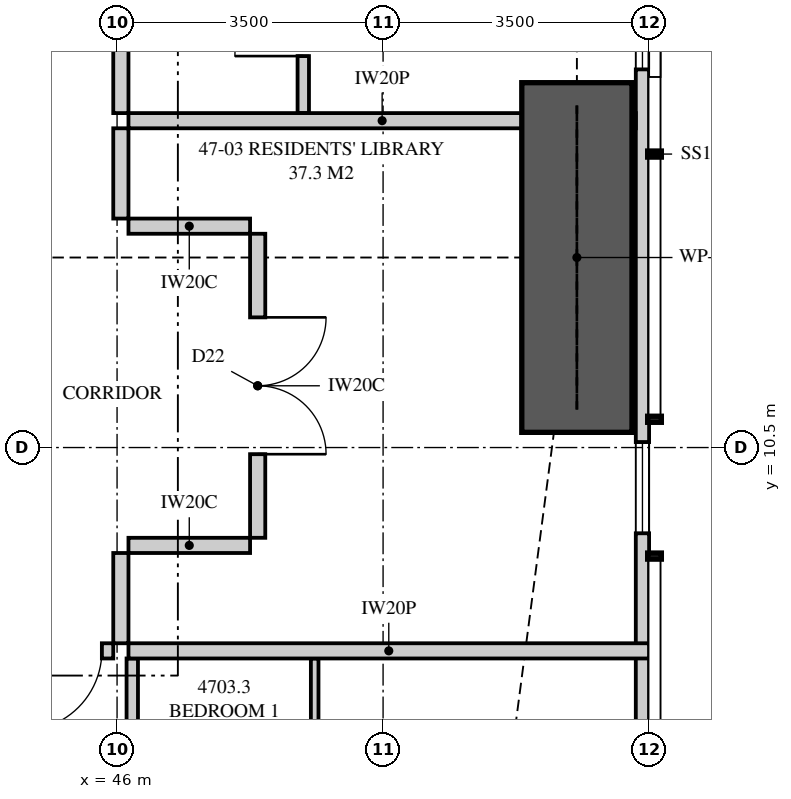
"""IFC4 building model, lengths in metres.
Left out: names, types, materials, properties, quantities, classifications, styles, units other than length and angle.
Written with IfcOpenShell. Run it as: python <this file> out.ifc"""

import sys

from ifc_helpers import new_model, si_unit, direction, frame, frame_2d, origin, place, context, subcontext, project, spatial, polyline, rectangle, outline, extrude, element, fill, save


model = new_model("IFC4")
c1 = context("Model", 3, precision=1e-05, world=origin(), true_north=direction((0.0, 1.0)))
c2 = subcontext(c1, "Body", "Model", "MODEL_VIEW")
j1 = project(units=[si_unit("LENGTHUNIT", "METRE"), si_unit("PLANEANGLEUNIT", "RADIAN")], contexts=[c1])
p1 = place(None, origin())
s1 = spatial("IfcSite", under=j1, at=p1, CompositionType="ELEMENT")
p2 = place(p1, origin())
s2 = spatial("IfcBuilding", under=s1, at=p2, CompositionType="ELEMENT")
p3 = place(p2, frame((0.0, 0.0, 174.45)))
s3 = spatial("IfcBuildingStorey", under=s2, at=p3, CompositionType="ELEMENT", Elevation=174.45)
p4 = place(p3, frame((52.913, 3.051, 0.0), z_axis=(0.0, 0.0, 1.0), x_axis=(0.0, 1.0, 0.0)))
e1 = element("IfcWall", 1, at=p4, inside=s3, PredefinedType="SOLIDWALL", context=c2, shape_type="SweptSolid", body=[
    extrude(outline(polyline([(0.0, 0.0), (29.897, 0.0), (29.897, 3.11), (22.167, 3.11), (22.167, 2.15), (22.074, 2.15), (22.074, 3.11), (21.949, 3.11), (21.949, 2.15), (9.949, 2.15), (9.949, 3.11), (9.847, 3.11), (9.847, 2.15), (9.706, 2.15), (9.706, 3.11), (0.0, 3.11), (0.0, 0.0)])), frame((0.0, 0.087, 0.0), z_axis=(0.0, -1.0, 0.0), x_axis=(1.0, 0.0, 0.0)), (0.0, 0.0, 1.0), 0.175),
])
p5 = place(p4, frame((1.797, 0.0, 0.4)))
e2 = element("IfcOpeningElement", 2, at=p5, cuts=e1, PredefinedType="OPENING", context=c2, shape_type="SweptSolid", body=[
    extrude(rectangle(XDim=1.8, YDim=1.7, at=frame_2d((0.9, 0.85))), frame((0.0, 0.097, 0.0), z_axis=(0.0, -1.0, 0.0), x_axis=(1.0, 0.0, 0.0)), (0.0, 0.0, 1.0), 0.195),
])
p6 = place(p4, frame((6.321, 0.0, 0.4)))
e3 = element("IfcOpeningElement", 3, at=p6, cuts=e1, PredefinedType="OPENING", context=c2, shape_type="SweptSolid", body=[
    extrude(rectangle(XDim=1.2, YDim=1.7, at=frame_2d((0.6, 0.85))), frame((0.0, 0.097, 0.0), z_axis=(0.0, -1.0, 0.0), x_axis=(1.0, 0.0, 0.0)), (0.0, 0.0, 1.0), 0.195),
])
p7 = place(p4, frame((12.424, 0.0, 0.4)))
e4 = element("IfcOpeningElement", 4, at=p7, cuts=e1, PredefinedType="OPENING", context=c2, shape_type="SweptSolid", body=[
    extrude(rectangle(XDim=1.8, YDim=1.7, at=frame_2d((0.9, 0.85))), frame((0.0, 0.097, 0.0), z_axis=(0.0, -1.0, 0.0), x_axis=(1.0, 0.0, 0.0)), (0.0, 0.0, 1.0), 0.195),
])
p8 = place(p4, frame((15.274, 0.0, 0.0)))
e5 = element("IfcOpeningElement", 5, at=p8, cuts=e1, PredefinedType="OPENING", context=c2, shape_type="SweptSolid", body=[
    extrude(rectangle(XDim=1.8, YDim=2.1, at=frame_2d((0.9, 1.05))), frame((0.0, 0.097, 0.0), z_axis=(0.0, -1.0, 0.0), x_axis=(1.0, 0.0, 0.0)), (0.0, 0.0, 1.0), 0.195),
])
p9 = place(p4, frame((17.736, 0.0, 0.4)))
e6 = element("IfcOpeningElement", 6, at=p9, cuts=e1, PredefinedType="OPENING", context=c2, shape_type="SweptSolid", body=[
    extrude(rectangle(XDim=1.8, YDim=1.7, at=frame_2d((0.9, 0.85))), frame((0.0, 0.097, 0.0), z_axis=(0.0, -1.0, 0.0), x_axis=(1.0, 0.0, 0.0)), (0.0, 0.0, 1.0), 0.195),
])
p10 = place(p4, frame((24.373, 0.0, 0.4)))
e7 = element("IfcOpeningElement", 7, at=p10, cuts=e1, PredefinedType="OPENING", context=c2, shape_type="SweptSolid", body=[
    extrude(rectangle(XDim=1.2, YDim=1.7, at=frame_2d((0.6, 0.85))), frame((0.0, 0.097, 0.0), z_axis=(0.0, -1.0, 0.0), x_axis=(1.0, 0.0, 0.0)), (0.0, 0.0, 1.0), 0.195),
])
p11 = place(p4, frame((26.861, 0.0, 0.4)))
e8 = element("IfcOpeningElement", 8, at=p11, cuts=e1, PredefinedType="OPENING", context=c2, shape_type="SweptSolid", body=[
    extrude(rectangle(XDim=2.4, YDim=1.7, at=frame_2d((1.2, 0.85))), frame((0.0, 0.097, 0.0), z_axis=(0.0, -1.0, 0.0), x_axis=(1.0, 0.0, 0.0)), (0.0, 0.0, 1.0), 0.195),
])
p12 = place(p3, frame((41.3, 7.825, 0.0), z_axis=(0.0, 0.0, 1.0), x_axis=(1.0, 0.0, 0.0)))
e9 = element("IfcWall", 9, at=p12, inside=s3, PredefinedType="PARTITIONING", context=c2, shape_type="SweptSolid", body=[
    extrude(outline(polyline([(0.0, 0.0), (4.65, 0.0), (4.65, 3.11), (1.787, 3.11), (1.787, 2.541), (1.113, 2.541), (1.113, 3.11), (0.0, 3.11), (0.0, 0.0)])), frame((0.0, 0.1, 0.0), z_axis=(0.0, -1.0, 0.0), x_axis=(1.0, 0.0, 0.0)), (0.0, 0.0, 1.0), 0.2),
])
p13 = place(p12, frame((3.45, 0.0, 0.0)))
e10 = element("IfcOpeningElement", 10, at=p13, cuts=e9, PredefinedType="OPENING", context=c2, shape_type="SweptSolid", body=[
    extrude(rectangle(XDim=1.05, YDim=2.2, at=frame_2d((0.525, 1.1))), frame((0.0, 0.11, 0.0), z_axis=(0.0, -1.0, 0.0), x_axis=(1.0, 0.0, 0.0)), (0.0, 0.0, 1.0), 0.22),
])
p14 = place(p3, frame((48.6, 3.796, 0.0), z_axis=(0.0, 0.0, 1.0), x_axis=(0.0, 1.0, 0.0)))
e11 = element("IfcWall", 11, at=p14, inside=s3, PredefinedType="PARTITIONING", context=c2, shape_type="SweptSolid", body=[
    extrude(rectangle(XDim=3.929, YDim=0.1, at=frame_2d((1.964, 0.0))), origin(), (0.0, 0.0, 1.0), 3.11),
])
p15 = place(p14, frame((1.477, 0.0, 0.0)))
e12 = element("IfcOpeningElement", 12, at=p15, cuts=e11, PredefinedType="OPENING", context=c2, shape_type="SweptSolid", body=[
    extrude(rectangle(XDim=0.9, YDim=2.1, at=frame_2d((0.45, 1.05))), frame((0.0, 0.06, 0.0), z_axis=(0.0, -1.0, 0.0), x_axis=(1.0, 0.0, 0.0)), (0.0, 0.0, 1.0), 0.12),
])
p16 = place(p3, frame((46.2, 3.796, 0.0), z_axis=(0.0, 0.0, 1.0), x_axis=(0.0, 1.0, 0.0)))
e13 = element("IfcWall", 13, at=p16, inside=s3, PredefinedType="PLUMBINGWALL", context=c2, shape_type="SweptSolid", body=[
    extrude(rectangle(XDim=3.929, YDim=0.15, at=frame_2d((1.964, 0.0))), origin(), (0.0, 0.0, 1.0), 3.11),
])
p17 = place(p3, frame((46.15, 7.825, 0.0), z_axis=(0.0, 0.0, 1.0), x_axis=(1.0, 0.0, 0.0)))
e14 = element("IfcWall", 14, at=p17, inside=s3, PredefinedType="PARTITIONING", context=c2, shape_type="SweptSolid", body=[
    extrude(outline(polyline([(0.0, 0.0), (6.85, 0.0), (6.85, 3.11), (6.138, 3.11), (6.138, 2.15), (4.303, 2.15), (4.303, 3.11), (0.0, 3.11), (0.0, 0.0)])), frame((0.0, 0.1, 0.0), z_axis=(0.0, -1.0, 0.0), x_axis=(1.0, 0.0, 0.0)), (0.0, 0.0, 1.0), 0.2),
])
p18 = place(p3, frame((52.825, 14.8, 0.0), z_axis=(0.0, 0.0, 1.0), x_axis=(-1.0, 0.0, 0.0)))
e15 = element("IfcWall", 15, at=p18, inside=s3, PredefinedType="PARTITIONING", context=c2, shape_type="SweptSolid", body=[
    extrude(outline(polyline([(0.529, 2.15), (0.0, 2.15), (0.0, 0.0), (0.529, 0.0), (0.529, 0.039), (1.021, 0.039), (1.021, 0.0), (6.675, 0.0), (6.675, 3.11), (1.685, 3.11), (1.685, 2.15), (1.021, 2.15), (1.021, 2.111), (0.529, 2.111), (0.529, 2.15)])), frame((0.0, 0.1, 0.0), z_axis=(0.0, -1.0, 0.0), x_axis=(1.0, 0.0, 0.0)), (0.0, 0.0, 1.0), 0.2),
])
p19 = place(p3, frame((46.05, 7.925, 0.0), z_axis=(0.0, 0.0, 1.0), x_axis=(0.0, 1.0, 0.0)))
e16 = element("IfcWall", 16, at=p19, inside=s3, PredefinedType="PARTITIONING", context=c2, shape_type="SweptSolid", body=[
    extrude(rectangle(XDim=1.188, YDim=0.2, at=frame_2d((0.594, 0.0))), origin(), (0.0, 0.0, 1.0), 3.11),
])
p20 = place(p3, frame((46.05, 14.9, 0.0), z_axis=(0.0, 0.0, 1.0), x_axis=(0.0, 1.0, 0.0)))
e17 = element("IfcWall", 17, at=p20, inside=s3, PredefinedType="PARTITIONING", context=c2, shape_type="SweptSolid", body=[
    extrude(rectangle(XDim=8.15, YDim=0.2, at=frame_2d((4.075, 0.0))), origin(), (0.0, 0.0, 1.0), 3.11),
])
p21 = place(p20, frame((3.575, 0.0, 0.0)))
e18 = element("IfcOpeningElement", 18, at=p21, cuts=e17, PredefinedType="OPENING", context=c2, shape_type="SweptSolid", body=[
    extrude(rectangle(XDim=1.05, YDim=2.2, at=frame_2d((0.525, 1.1))), frame((0.0, 0.11, 0.0), z_axis=(0.0, -1.0, 0.0), x_axis=(1.0, 0.0, 0.0)), (0.0, 0.0, 1.0), 0.22),
])
p22 = place(p3, frame((48.45, 14.9, 0.0), z_axis=(0.0, 0.0, 1.0), x_axis=(0.0, 1.0, 0.0)))
e19 = element("IfcWall", 19, at=p22, inside=s3, PredefinedType="PLUMBINGWALL", context=c2, shape_type="SweptSolid", body=[
    extrude(rectangle(XDim=2.425, YDim=0.15, at=frame_2d((1.212, 0.0))), origin(), (0.0, 0.0, 1.0), 3.11),
])
p23 = place(p22, frame((0.75, 0.0, 0.0)))
e20 = element("IfcOpeningElement", 20, at=p23, cuts=e19, PredefinedType="OPENING", context=c2, shape_type="SweptSolid", body=[
    extrude(rectangle(XDim=0.9, YDim=2.1, at=frame_2d((0.45, 1.05))), frame((0.0, 0.085, 0.0), z_axis=(0.0, -1.0, 0.0), x_axis=(1.0, 0.0, 0.0)), (0.0, 0.0, 1.0), 0.17),
])
p24 = place(p3, frame((46.05, 13.512, 0.0), z_axis=(0.0, 0.0, 1.0), x_axis=(0.0, 1.0, 0.0)))
e21 = element("IfcWall", 21, at=p24, inside=s3, PredefinedType="PARTITIONING", context=c2, shape_type="SweptSolid", body=[
    extrude(rectangle(XDim=1.188, YDim=0.2, at=frame_2d((0.594, 0.0))), origin(), (0.0, 0.0, 1.0), 3.11),
])
p25 = place(p3, frame((47.85, 9.312, 0.0), z_axis=(0.0, 0.0, 1.0), x_axis=(0.0, 1.0, 0.0)))
e22 = element("IfcWall", 22, at=p25, inside=s3, PredefinedType="PARTITIONING", context=c2, shape_type="SweptSolid", body=[
    extrude(outline(polyline([(0.0, 0.0), (4.0, 0.0), (4.0, 3.11), (4.0, 2.541), (3.35, 2.541), (3.35, 3.11), (0.0, 3.11), (0.0, 0.0)])), frame((0.0, 0.1, 0.0), z_axis=(0.0, -1.0, 0.0), x_axis=(1.0, 0.0, 0.0)), (0.0, 0.0, 1.0), 0.2),
])
p26 = place(p25, frame((1.1, 0.0, 0.0)))
e23 = element("IfcOpeningElement", 23, at=p26, cuts=e22, PredefinedType="OPENING", context=c2, shape_type="SweptSolid", body=[
    extrude(rectangle(XDim=1.8, YDim=2.1, at=frame_2d((0.9, 1.05))), frame((0.0, 0.11, 0.0), z_axis=(0.0, -1.0, 0.0), x_axis=(1.0, 0.0, 0.0)), (0.0, 0.0, 1.0), 0.22),
])
for number, where, z_axis, x_axis in (
    (24, (46.15, 9.212, 0.0), (0.0, 0.0, 1.0), (1.0, 0.0, 0.0)),
    (25, (46.15, 13.413, 0.0), (0.0, 0.0, 1.0), (1.0, 0.0, 0.0)),
):
    element("IfcWall", number, at=place(p3, frame(where, z_axis=z_axis, x_axis=x_axis)), inside=s3, PredefinedType="PARTITIONING", context=c2, shape_type="SweptSolid", body=[
        extrude(rectangle(XDim=1.6, YDim=0.2, at=frame_2d((0.8, 0.0))), origin(), (0.0, 0.0, 1.0), 3.11),
    ])
p27 = place(p3, frame((52.05, 10.7, 0.0), z_axis=(0.0, 0.0, 1.0), x_axis=(0.0, 1.0, 0.0)))
e26 = element("IfcWall", 26, at=p27, inside=s3, PredefinedType="SHEAR", context=c2, shape_type="SweptSolid", body=[
    extrude(rectangle(XDim=4.6, YDim=1.45, at=frame_2d((2.3, 0.0))), origin(), (0.0, 0.0, 1.0), 3.35),
])
p28 = place(p6, origin())
e27 = element("IfcWindow", 27, at=p28, inside=s3, PartitioningType="SINGLE_PANEL", PredefinedType="WINDOW", context=c2, shape_type="SweptSolid", body=[
    extrude(rectangle(XDim=1.2, YDim=1.7, at=frame_2d((0.6, 0.85))), frame((0.0, 0.03, 0.0), z_axis=(0.0, -1.0, 0.0), x_axis=(1.0, 0.0, 0.0)), (0.0, 0.0, 1.0), 0.06),
])
fill(e3, e27)
p29 = place(p7, origin())
e28 = element("IfcWindow", 28, at=p29, inside=s3, PartitioningType="SINGLE_PANEL", PredefinedType="WINDOW", context=c2, shape_type="SweptSolid", body=[
    extrude(rectangle(XDim=1.8, YDim=1.7, at=frame_2d((0.9, 0.85))), frame((0.0, 0.03, 0.0), z_axis=(0.0, -1.0, 0.0), x_axis=(1.0, 0.0, 0.0)), (0.0, 0.0, 1.0), 0.06),
])
fill(e4, e28)
p30 = place(p13, frame((1.05, 0.0, 0.0), z_axis=(0.0, 0.0, 1.0), x_axis=(-1.0, 0.0, 0.0)))
e29 = element("IfcDoor", 29, at=p30, inside=s3, OperationType="SINGLE_SWING_RIGHT", PredefinedType="DOOR", context=c2, shape_type="SweptSolid", body=[
    extrude(rectangle(XDim=1.05, YDim=2.2, at=frame_2d((0.525, 1.1))), frame((0.0, 0.025, 0.0), z_axis=(0.0, -1.0, 0.0), x_axis=(1.0, 0.0, 0.0)), (0.0, 0.0, 1.0), 0.05),
])
fill(e10, e29)
p31 = place(p26, frame((1.8, 0.0, 0.0), z_axis=(0.0, 0.0, 1.0), x_axis=(-1.0, 0.0, 0.0)))
e30 = element("IfcDoor", 30, at=p31, inside=s3, OperationType="DOUBLE_DOOR_SINGLE_SWING", PredefinedType="DOOR", context=c2, shape_type="SweptSolid", body=[
    extrude(rectangle(XDim=1.8, YDim=2.1, at=frame_2d((0.9, 1.05))), frame((0.0, 0.025, 0.0), z_axis=(0.0, -1.0, 0.0), x_axis=(1.0, 0.0, 0.0)), (0.0, 0.0, 1.0), 0.05),
])
fill(e23, e30)
p32 = place(p23, origin())
e31 = element("IfcDoor", 31, at=p32, inside=s3, OperationType="SINGLE_SWING_LEFT", PredefinedType="DOOR", context=c2, shape_type="SweptSolid", body=[
    extrude(rectangle(XDim=0.9, YDim=2.1, at=frame_2d((0.45, 1.05))), frame((0.0, 0.025, 0.0), z_axis=(0.0, -1.0, 0.0), x_axis=(1.0, 0.0, 0.0)), (0.0, 0.0, 1.0), 0.05),
])
fill(e20, e31)
save(model, sys.argv[1])
